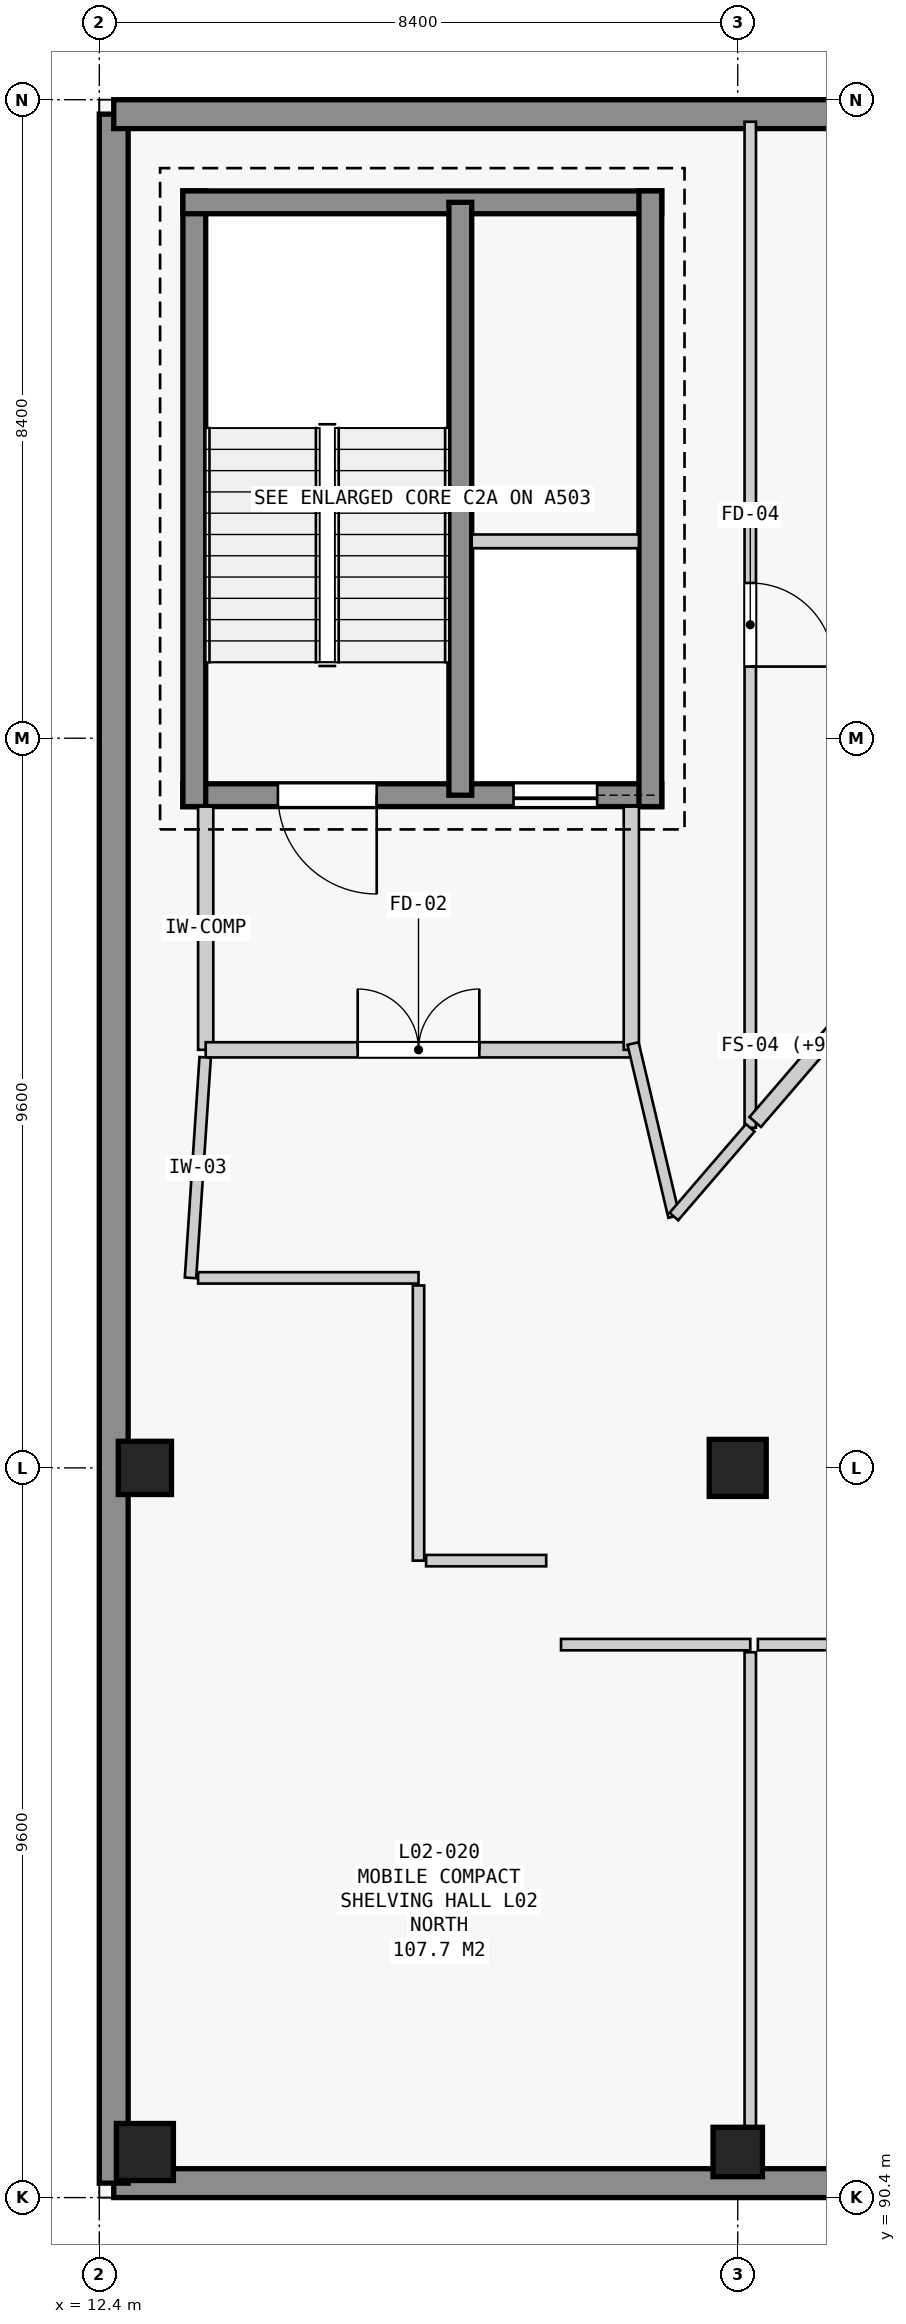
"""IFC4 building model, lengths in metres.
Left out: names, types, materials, properties, quantities, classifications, styles, units other than length and angle.
Written with IfcOpenShell. Run it as: python <this file> out.ifc"""

import sys

from ifc_helpers import new_model, si_unit, direction, frame, frame_2d, origin, origin_2d, place, context, subcontext, project, spatial, rectangle, extrude, element, fill, save


model = new_model("IFC4")
c1 = context("Model", 3, precision=1e-05, world=origin(), true_north=direction((0.0, 1.0)))
c2 = subcontext(c1, "Body", "Model", "MODEL_VIEW")
j1 = project(units=[si_unit("LENGTHUNIT", "METRE"), si_unit("PLANEANGLEUNIT", "RADIAN")], contexts=[c1])
p1 = place(None, origin())
s1 = spatial("IfcSite", under=j1, at=p1, CompositionType="ELEMENT")
p2 = place(p1, origin())
s2 = spatial("IfcBuilding", under=s1, at=p2, CompositionType="ELEMENT")
p3 = place(p2, frame((0.0, 0.0, 9.6)))
s3 = spatial("IfcBuildingStorey", under=s2, at=p3, CompositionType="ELEMENT", Elevation=9.6)
p4 = place(p3, frame((13.0, 91.0, 0.0), z_axis=(0.0, 0.0, 1.0), x_axis=(1.0, 0.0, 0.0)))
e1 = element("IfcColumn", 1, at=p4, inside=s3, PredefinedType="COLUMN", context=c2, shape_type="SweptSolid", body=[
    extrude(rectangle(XDim=0.75, YDim=0.75, at=origin_2d()), origin(), (0.0, 0.0, 1.0), 4.2),
])
p5 = place(p3, frame((13.0, 100.0, 0.0), z_axis=(0.0, 0.0, 1.0), x_axis=(1.0, 0.0, 0.0)))
e2 = element("IfcColumn", 2, at=p5, inside=s3, PredefinedType="COLUMN", context=c2, shape_type="SweptSolid", body=[
    extrude(rectangle(XDim=0.7, YDim=0.7, at=origin_2d()), origin(), (0.0, 0.0, 1.0), 4.2),
])
p6 = place(p3, frame((20.8, 91.0, 0.0), z_axis=(0.0, 0.0, 1.0), x_axis=(1.0, 0.0, 0.0)))
e3 = element("IfcColumn", 3, at=p6, inside=s3, PredefinedType="COLUMN", context=c2, shape_type="SweptSolid", body=[
    extrude(rectangle(XDim=0.65, YDim=0.65, at=origin_2d()), origin(), (0.0, 0.0, 1.0), 4.2),
])
p7 = place(p3, frame((20.8, 100.0, 0.0), z_axis=(0.0, 0.0, 1.0), x_axis=(1.0, 0.0, 0.0)))
e4 = element("IfcColumn", 4, at=p7, inside=s3, PredefinedType="COLUMN", context=c2, shape_type="SweptSolid", body=[
    extrude(rectangle(XDim=0.75, YDim=0.75, at=origin_2d()), origin(), (0.0, 0.0, 1.0), 4.2),
])
p8 = place(p3, frame((45.71, 90.59, 0.0), z_axis=(0.0, 0.0, 1.0), x_axis=(-1.0, 0.0, 0.0)))
e5 = element("IfcWall", 5, at=p8, inside=s3, PredefinedType="STANDARD", context=c2, shape_type="SweptSolid", body=[
    extrude(rectangle(XDim=33.12, YDim=0.38, at=frame_2d((16.56, 0.0))), origin(), (0.0, 0.0, 1.0), 3.88),
])
p9 = place(p3, frame((12.59, 90.59, 0.0), z_axis=(0.0, 0.0, 1.0), x_axis=(0.0, 1.0, 0.0)))
e6 = element("IfcWall", 6, at=p9, inside=s3, PredefinedType="STANDARD", context=c2, shape_type="SweptSolid", body=[
    extrude(rectangle(XDim=27.22, YDim=0.38, at=frame_2d((13.61, 0.0))), origin(), (0.0, 0.0, 1.0), 3.88),
])
p10 = place(p3, frame((12.59, 117.81, 0.0), z_axis=(0.0, 0.0, 1.0), x_axis=(1.0, 0.0, 0.0)))
e7 = element("IfcWall", 7, at=p10, inside=s3, PredefinedType="STANDARD", context=c2, shape_type="SweptSolid", body=[
    extrude(rectangle(XDim=33.12, YDim=0.38, at=frame_2d((16.56, 0.0))), origin(), (0.0, 0.0, 1.0), 3.88),
])
p11 = place(p3, frame((19.8, 108.85, 0.0), z_axis=(0.0, 0.0, 1.0), x_axis=(-1.0, 0.0, 0.0)))
e8 = element("IfcWall", 8, at=p11, inside=s3, PredefinedType="SHEAR", context=c2, shape_type="SweptSolid", body=[
    extrude(rectangle(XDim=6.3, YDim=0.3, at=frame_2d((3.15, 0.0))), origin(), (0.0, 0.0, 1.0), 3.88),
])
p12 = place(p11, frame((3.75, 0.0, 0.0)))
e9 = element("IfcOpeningElement", 9, at=p12, cuts=e8, PredefinedType="OPENING", context=c2, shape_type="SweptSolid", body=[
    extrude(rectangle(XDim=1.3, YDim=2.2, at=frame_2d((0.65, 1.1))), frame((0.0, 0.16, 0.0), z_axis=(0.0, -1.0, 0.0), x_axis=(1.0, 0.0, 0.0)), (0.0, 0.0, 1.0), 0.32),
])
p13 = place(p11, frame((0.85, 0.0, 0.0)))
e10 = element("IfcOpeningElement", 10, at=p13, cuts=e8, PredefinedType="OPENING", context=c2, shape_type="SweptSolid", body=[
    extrude(rectangle(XDim=1.1, YDim=2.15, at=frame_2d((0.55, 1.075))), frame((0.0, 0.16, 0.0), z_axis=(0.0, -1.0, 0.0), x_axis=(1.0, 0.0, 0.0)), (0.0, 0.0, 1.0), 0.32),
])
p14 = place(p3, frame((13.65, 108.7, 0.0), z_axis=(0.0, 0.0, 1.0), x_axis=(0.0, 1.0, 0.0)))
e11 = element("IfcWall", 11, at=p14, inside=s3, PredefinedType="SHEAR", context=c2, shape_type="SweptSolid", body=[
    extrude(rectangle(XDim=8.1, YDim=0.3, at=frame_2d((4.05, 0.0))), origin(), (0.0, 0.0, 1.0), 3.88),
])
p15 = place(p3, frame((13.5, 116.65, 0.0), z_axis=(0.0, 0.0, 1.0), x_axis=(1.0, 0.0, 0.0)))
e12 = element("IfcWall", 12, at=p15, inside=s3, PredefinedType="SHEAR", context=c2, shape_type="SweptSolid", body=[
    extrude(rectangle(XDim=6.3, YDim=0.3, at=frame_2d((3.15, 0.0))), origin(), (0.0, 0.0, 1.0), 3.88),
])
p16 = place(p3, frame((19.65, 116.8, 0.0), z_axis=(0.0, 0.0, 1.0), x_axis=(0.0, -1.0, 0.0)))
e13 = element("IfcWall", 13, at=p16, inside=s3, PredefinedType="SHEAR", context=c2, shape_type="SweptSolid", body=[
    extrude(rectangle(XDim=8.1, YDim=0.3, at=frame_2d((4.05, 0.0))), origin(), (0.0, 0.0, 1.0), 3.88),
])
p17 = place(p3, frame((17.15, 108.85, 0.0), z_axis=(0.0, 0.0, 1.0), x_axis=(0.0, 1.0, 0.0)))
e14 = element("IfcWall", 14, at=p17, inside=s3, PredefinedType="SHEAR", context=c2, shape_type="SweptSolid", body=[
    extrude(rectangle(XDim=7.8, YDim=0.3, at=frame_2d((3.9, 0.0))), origin(), (0.0, 0.0, 1.0), 3.88),
])
p18 = place(p3, frame((17.3, 112.19, 0.0), z_axis=(0.0, 0.0, 1.0), x_axis=(1.0, 0.0, 0.0)))
e15 = element("IfcWall", 15, at=p18, inside=s3, PredefinedType="PARTITIONING", context=c2, shape_type="SweptSolid", body=[
    extrude(rectangle(XDim=2.2, YDim=0.18, at=frame_2d((1.1, 0.0))), origin(), (0.0, 0.0, 1.0), 3.88),
])
p19 = place(p3, frame((13.8, 108.7, 0.0), z_axis=(0.0, 0.0, 1.0), x_axis=(0.0, -1.0, 0.0)))
e16 = element("IfcWall", 16, at=p19, inside=s3, PredefinedType="STANDARD", context=c2, shape_type="SweptSolid", body=[
    extrude(rectangle(XDim=3.2, YDim=0.2, at=frame_2d((1.6, 0.0))), origin(), (0.0, 0.0, 1.0), 3.88),
])
p20 = place(p3, frame((13.8, 105.5, 0.0), z_axis=(0.0, 0.0, 1.0), x_axis=(1.0, 0.0, 0.0)))
e17 = element("IfcWall", 17, at=p20, inside=s3, PredefinedType="STANDARD", context=c2, shape_type="SweptSolid", body=[
    extrude(rectangle(XDim=5.6, YDim=0.2, at=frame_2d((2.8, 0.0))), origin(), (0.0, 0.0, 1.0), 3.88),
])
p21 = place(p20, frame((2.0, 0.0, 0.0)))
e18 = element("IfcOpeningElement", 18, at=p21, cuts=e17, PredefinedType="OPENING", context=c2, shape_type="SweptSolid", body=[
    extrude(rectangle(XDim=1.6, YDim=2.2, at=frame_2d((0.8, 1.1))), frame((0.0, 0.11, 0.0), z_axis=(0.0, -1.0, 0.0), x_axis=(1.0, 0.0, 0.0)), (0.0, 0.0, 1.0), 0.22),
])
p22 = place(p3, frame((19.4, 105.5, 0.0), z_axis=(0.0, 0.0, 1.0), x_axis=(0.0, 1.0, 0.0)))
e19 = element("IfcWall", 19, at=p22, inside=s3, PredefinedType="STANDARD", context=c2, shape_type="SweptSolid", body=[
    extrude(rectangle(XDim=3.2, YDim=0.2, at=frame_2d((1.6, 0.0))), origin(), (0.0, 0.0, 1.0), 3.88),
])
p23 = place(p3, frame((19.96, 103.307, 0.0), z_axis=(0.0, 0.0, 1.0), x_axis=(-0.229592143179, 0.973286929837, 0.0)))
e20 = element("IfcWall", 20, at=p23, inside=s3, PredefinedType="PARTITIONING", context=c2, shape_type="SweptSolid", body=[
    extrude(rectangle(XDim=2.338, YDim=0.15, at=frame_2d((1.169, 0.0))), origin(), (0.0, 0.0, 1.0), 3.88),
])
p24 = place(p3, frame((13.793, 105.4, 0.0), z_axis=(0.0, 0.0, 1.0), x_axis=(-0.066440960793, -0.997790358106, 0.0)))
e21 = element("IfcWall", 21, at=p24, inside=s3, PredefinedType="PARTITIONING", context=c2, shape_type="SweptSolid", body=[
    extrude(rectangle(XDim=2.906, YDim=0.15, at=frame_2d((1.453, 0.0))), origin(), (0.0, 0.0, 1.0), 3.88),
])
p25 = place(p3, frame((13.7, 102.5, 0.0), z_axis=(0.0, 0.0, 1.0), x_axis=(1.0, 0.0, 0.0)))
e22 = element("IfcWall", 22, at=p25, inside=s3, PredefinedType="PARTITIONING", context=c2, shape_type="SweptSolid", body=[
    extrude(rectangle(XDim=2.9, YDim=0.15, at=frame_2d((1.45, 0.0))), origin(), (0.0, 0.0, 1.0), 3.88),
])
p26 = place(p3, frame((16.6, 102.4, 0.0), z_axis=(0.0, 0.0, 1.0), x_axis=(0.0, -1.0, 0.0)))
e23 = element("IfcWall", 23, at=p26, inside=s3, PredefinedType="PARTITIONING", context=c2, shape_type="SweptSolid", body=[
    extrude(rectangle(XDim=3.62, YDim=0.15, at=frame_2d((1.81, 0.0))), origin(), (0.0, 0.0, 1.0), 3.06),
])
p27 = place(p3, frame((16.7, 98.78, 0.0), z_axis=(0.0, 0.0, 1.0), x_axis=(1.0, 0.0, 0.0)))
e24 = element("IfcWall", 24, at=p27, inside=s3, PredefinedType="PARTITIONING", context=c2, shape_type="SweptSolid", body=[
    extrude(rectangle(XDim=1.58, YDim=0.15, at=frame_2d((0.79, 0.0))), origin(), (0.0, 0.0, 1.0), 3.34),
])
p28 = place(p3, frame((18.475, 97.675, 0.0), z_axis=(0.0, 0.0, 1.0), x_axis=(1.0, 0.0, 0.0)))
e25 = element("IfcWall", 25, at=p28, inside=s3, PredefinedType="PARTITIONING", context=c2, shape_type="SweptSolid", body=[
    extrude(rectangle(XDim=2.49, YDim=0.15, at=frame_2d((1.245, 0.0))), origin(), (0.0, 0.0, 1.0), 3.16),
])
p29 = place(p3, frame((20.965, 97.575, 0.0), z_axis=(0.0, 0.0, 1.0), x_axis=(0.0, -1.0, 0.0)))
e26 = element("IfcWall", 26, at=p29, inside=s3, PredefinedType="PARTITIONING", context=c2, shape_type="SweptSolid", body=[
    extrude(rectangle(XDim=6.885, YDim=0.15, at=frame_2d((3.442, 0.0))), origin(), (0.0, 0.0, 1.0), 3.16),
])
p30 = place(p3, frame((20.965, 117.71, 0.0), z_axis=(0.0, 0.0, 1.0), x_axis=(0.0, -1.0, 0.0)))
e27 = element("IfcWall", 27, at=p30, inside=s3, PredefinedType="PARTITIONING", context=c2, shape_type="SweptSolid", body=[
    extrude(rectangle(XDim=13.235, YDim=0.15, at=frame_2d((6.618, 0.0))), origin(), (0.0, 0.0, 1.0), 3.88),
])
p31 = place(p30, frame((6.068, 0.0, 0.0)))
e28 = element("IfcOpeningElement", 28, at=p31, cuts=e27, PredefinedType="OPENING", context=c2, shape_type="SweptSolid", body=[
    extrude(rectangle(XDim=1.1, YDim=2.15, at=frame_2d((0.55, 1.075))), frame((0.0, 0.085, 0.0), z_axis=(0.0, -1.0, 0.0), x_axis=(1.0, 0.0, 0.0)), (0.0, 0.0, 1.0), 0.17),
])
p32 = place(p3, frame((20.965, 104.475, 0.0), z_axis=(0.0, 0.0, 1.0), x_axis=(-0.652368947126, -0.75790154824, 0.0)))
e29 = element("IfcWall", 29, at=p32, inside=s3, PredefinedType="PARTITIONING", context=c2, shape_type="SweptSolid", body=[
    extrude(rectangle(XDim=1.541, YDim=0.15, at=frame_2d((0.771, 0.0))), origin(), (0.0, 0.0, 1.0), 3.88),
])
p33 = place(p3, frame((21.065, 97.675, 0.0), z_axis=(0.0, 0.0, 1.0), x_axis=(1.0, 0.0, 0.0)))
e30 = element("IfcWall", 30, at=p33, inside=s3, PredefinedType="PARTITIONING", context=c2, shape_type="SweptSolid", body=[
    extrude(rectangle(XDim=1.96, YDim=0.15, at=frame_2d((0.98, 0.0))), origin(), (0.0, 0.0, 1.0), 3.16),
])
p34 = place(p3, frame((26.9, 111.369, 0.0), z_axis=(0.0, 0.0, 1.0), x_axis=(-0.652372072254, -0.757898858254, 0.0)))
e31 = element("IfcWall", 31, at=p34, inside=s3, PredefinedType="STANDARD", context=c2, shape_type="SweptSolid", body=[
    extrude(rectangle(XDim=8.997, YDim=0.2, at=frame_2d((4.499, 0.0))), origin(), (0.0, 0.0, 1.0), 3.88),
])
p35 = place(p12, origin())
e32 = element("IfcDoor", 32, at=p35, inside=s3, OperationType="SINGLE_SWING_LEFT", PredefinedType="DOOR", context=c2, shape_type="SweptSolid", body=[
    extrude(rectangle(XDim=1.3, YDim=2.2, at=frame_2d((0.65, 1.1))), frame((0.0, 0.025, 0.0), z_axis=(0.0, -1.0, 0.0), x_axis=(1.0, 0.0, 0.0)), (0.0, 0.0, 1.0), 0.05),
])
fill(e9, e32)
p36 = place(p13, origin())
e33 = element("IfcDoor", 33, at=p36, inside=s3, OperationType="SLIDING_TO_LEFT", PredefinedType="DOOR", context=c2, shape_type="SweptSolid", body=[
    extrude(rectangle(XDim=1.1, YDim=2.15, at=frame_2d((0.55, 1.075))), frame((0.0, 0.025, 0.0), z_axis=(0.0, -1.0, 0.0), x_axis=(1.0, 0.0, 0.0)), (0.0, 0.0, 1.0), 0.05),
])
fill(e10, e33)
p37 = place(p21, origin())
e34 = element("IfcDoor", 34, at=p37, inside=s3, OperationType="DOUBLE_DOOR_SINGLE_SWING", PredefinedType="DOOR", context=c2, shape_type="SweptSolid", body=[
    extrude(rectangle(XDim=1.6, YDim=2.2, at=frame_2d((0.8, 1.1))), frame((0.0, 0.025, 0.0), z_axis=(0.0, -1.0, 0.0), x_axis=(1.0, 0.0, 0.0)), (0.0, 0.0, 1.0), 0.05),
])
fill(e18, e34)
p38 = place(p31, origin())
e35 = element("IfcDoor", 35, at=p38, inside=s3, OperationType="SINGLE_SWING_RIGHT", PredefinedType="DOOR", context=c2, shape_type="SweptSolid", body=[
    extrude(rectangle(XDim=1.1, YDim=2.15, at=frame_2d((0.55, 1.075))), frame((0.0, 0.025, 0.0), z_axis=(0.0, -1.0, 0.0), x_axis=(1.0, 0.0, 0.0)), (0.0, 0.0, 1.0), 0.05),
])
fill(e28, e35)
save(model, sys.argv[1])
